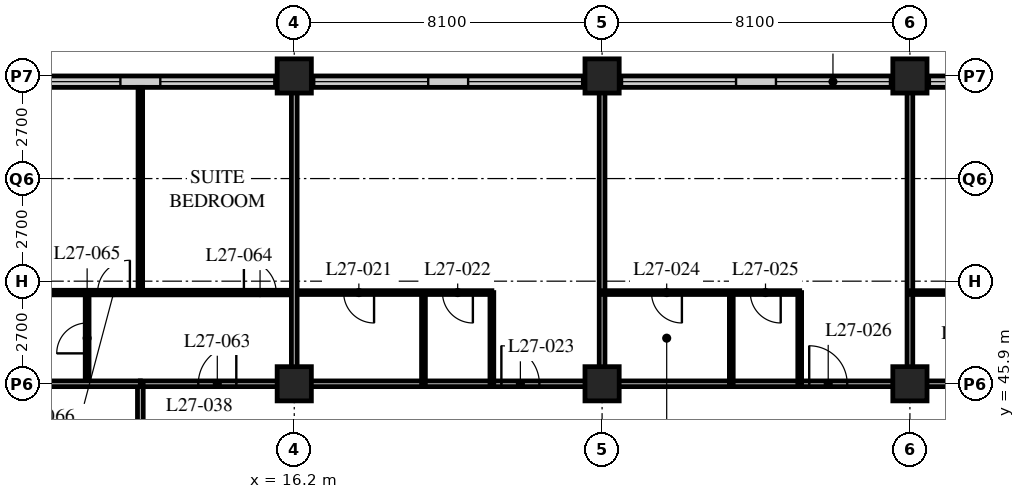
"""IFC4 building model, lengths in metres.
Left out: names, types, materials, properties, quantities, classifications, styles, units other than length and angle.
Written with IfcOpenShell. Run it as: python <this file> out.ifc"""

import sys

from ifc_helpers import new_model, si_unit, direction, frame, frame_2d, origin, origin_2d, place, context, subcontext, project, spatial, rectangle, hollow_rectangle, extrude, element, fill, save


model = new_model("IFC4")
c1 = context("Model", 3, precision=1e-05, world=origin(), true_north=direction((0.0, 1.0)))
c2 = subcontext(c1, "Body", "Model", "MODEL_VIEW")
j1 = project(units=[si_unit("LENGTHUNIT", "METRE"), si_unit("PLANEANGLEUNIT", "RADIAN")], contexts=[c1])
p1 = place(None, origin())
s1 = spatial("IfcSite", under=j1, at=p1, CompositionType="ELEMENT")
p2 = place(p1, origin())
s2 = spatial("IfcBuilding", under=s1, at=p2, CompositionType="ELEMENT")
p3 = place(p2, frame((0.0, 0.0, 110.2)))
s3 = spatial("IfcBuildingStorey", under=s2, at=p3, CompositionType="ELEMENT", Elevation=110.2)
for number, where, z_axis, x_axis in (
    (1, (16.2, 45.9, 0.0), (0.0, 0.0, 1.0), (1.0, 0.0, 0.0)),
    (2, (16.2, 54.0, 0.0), (0.0, 0.0, 1.0), (1.0, 0.0, 0.0)),
    (3, (24.3, 45.9, 0.0), (0.0, 0.0, 1.0), (1.0, 0.0, 0.0)),
    (4, (24.3, 54.0, 0.0), (0.0, 0.0, 1.0), (1.0, 0.0, 0.0)),
    (5, (32.4, 45.9, 0.0), (0.0, 0.0, 1.0), (1.0, 0.0, 0.0)),
    (6, (32.4, 54.0, 0.0), (0.0, 0.0, 1.0), (1.0, 0.0, 0.0)),
):
    element("IfcColumn", number, at=place(p3, frame(where, z_axis=z_axis, x_axis=x_axis)), inside=s3, PredefinedType="COLUMN", context=c2, shape_type="SweptSolid", body=[
        extrude(hollow_rectangle(XDim=0.9, YDim=0.9, WallThickness=0.09, at=origin_2d()), origin(), (0.0, 0.0, 1.0), 3.4),
    ])
p4 = place(p3, frame((48.3, 53.85, 0.0), z_axis=(0.0, 0.0, 1.0), x_axis=(-1.0, 0.0, 0.0)))
e7 = element("IfcWall", 7, at=p4, inside=s3, PredefinedType="SOLIDWALL", context=c2, shape_type="SweptSolid", body=[
    extrude(rectangle(XDim=40.2, YDim=0.3, at=frame_2d((20.1, 0.0))), origin(), (0.0, 0.0, 1.0), 3.19),
])
p5 = place(p4, frame((0.225, 0.0, 0.9)))
e8 = element("IfcOpeningElement", 8, at=p5, cuts=e7, PredefinedType="OPENING", context=c2, shape_type="SweptSolid", body=[
    extrude(rectangle(XDim=3.0, YDim=2.0, at=frame_2d((1.5, 1.0))), frame((0.0, 0.16, 0.0), z_axis=(0.0, -1.0, 0.0), x_axis=(1.0, 0.0, 0.0)), (0.0, 0.0, 1.0), 0.32),
])
p6 = place(p4, frame((4.275, 0.0, 0.9)))
e9 = element("IfcOpeningElement", 9, at=p6, cuts=e7, PredefinedType="OPENING", context=c2, shape_type="SweptSolid", body=[
    extrude(rectangle(XDim=3.0, YDim=2.0, at=frame_2d((1.5, 1.0))), frame((0.0, 0.16, 0.0), z_axis=(0.0, -1.0, 0.0), x_axis=(1.0, 0.0, 0.0)), (0.0, 0.0, 1.0), 0.32),
])
p7 = place(p4, frame((8.325, 0.0, 0.9)))
e10 = element("IfcOpeningElement", 10, at=p7, cuts=e7, PredefinedType="OPENING", context=c2, shape_type="SweptSolid", body=[
    extrude(rectangle(XDim=3.0, YDim=2.0, at=frame_2d((1.5, 1.0))), frame((0.0, 0.16, 0.0), z_axis=(0.0, -1.0, 0.0), x_axis=(1.0, 0.0, 0.0)), (0.0, 0.0, 1.0), 0.32),
])
p8 = place(p4, frame((12.375, 0.0, 0.9)))
e11 = element("IfcOpeningElement", 11, at=p8, cuts=e7, PredefinedType="OPENING", context=c2, shape_type="SweptSolid", body=[
    extrude(rectangle(XDim=3.0, YDim=2.0, at=frame_2d((1.5, 1.0))), frame((0.0, 0.16, 0.0), z_axis=(0.0, -1.0, 0.0), x_axis=(1.0, 0.0, 0.0)), (0.0, 0.0, 1.0), 0.32),
])
p9 = place(p4, frame((16.425, 0.0, 0.9)))
e12 = element("IfcOpeningElement", 12, at=p9, cuts=e7, PredefinedType="OPENING", context=c2, shape_type="SweptSolid", body=[
    extrude(rectangle(XDim=3.0, YDim=2.0, at=frame_2d((1.5, 1.0))), frame((0.0, 0.16, 0.0), z_axis=(0.0, -1.0, 0.0), x_axis=(1.0, 0.0, 0.0)), (0.0, 0.0, 1.0), 0.32),
])
p10 = place(p4, frame((20.475, 0.0, 0.9)))
e13 = element("IfcOpeningElement", 13, at=p10, cuts=e7, PredefinedType="OPENING", context=c2, shape_type="SweptSolid", body=[
    extrude(rectangle(XDim=3.0, YDim=2.0, at=frame_2d((1.5, 1.0))), frame((0.0, 0.16, 0.0), z_axis=(0.0, -1.0, 0.0), x_axis=(1.0, 0.0, 0.0)), (0.0, 0.0, 1.0), 0.32),
])
p11 = place(p4, frame((24.525, 0.0, 0.9)))
e14 = element("IfcOpeningElement", 14, at=p11, cuts=e7, PredefinedType="OPENING", context=c2, shape_type="SweptSolid", body=[
    extrude(rectangle(XDim=3.0, YDim=2.0, at=frame_2d((1.5, 1.0))), frame((0.0, 0.16, 0.0), z_axis=(0.0, -1.0, 0.0), x_axis=(1.0, 0.0, 0.0)), (0.0, 0.0, 1.0), 0.32),
])
p12 = place(p4, frame((28.575, 0.0, 0.9)))
e15 = element("IfcOpeningElement", 15, at=p12, cuts=e7, PredefinedType="OPENING", context=c2, shape_type="SweptSolid", body=[
    extrude(rectangle(XDim=3.0, YDim=2.0, at=frame_2d((1.5, 1.0))), frame((0.0, 0.16, 0.0), z_axis=(0.0, -1.0, 0.0), x_axis=(1.0, 0.0, 0.0)), (0.0, 0.0, 1.0), 0.32),
])
p13 = place(p4, frame((32.625, 0.0, 0.9)))
e16 = element("IfcOpeningElement", 16, at=p13, cuts=e7, PredefinedType="OPENING", context=c2, shape_type="SweptSolid", body=[
    extrude(rectangle(XDim=3.0, YDim=2.0, at=frame_2d((1.5, 1.0))), frame((0.0, 0.16, 0.0), z_axis=(0.0, -1.0, 0.0), x_axis=(1.0, 0.0, 0.0)), (0.0, 0.0, 1.0), 0.32),
])
p14 = place(p4, frame((36.675, 0.0, 0.9)))
e17 = element("IfcOpeningElement", 17, at=p14, cuts=e7, PredefinedType="OPENING", context=c2, shape_type="SweptSolid", body=[
    extrude(rectangle(XDim=3.0, YDim=2.0, at=frame_2d((1.5, 1.0))), frame((0.0, 0.16, 0.0), z_axis=(0.0, -1.0, 0.0), x_axis=(1.0, 0.0, 0.0)), (0.0, 0.0, 1.0), 0.32),
])
p15 = place(p3, frame((12.15, 45.9, 0.0), z_axis=(0.0, 0.0, 1.0), x_axis=(1.0, 0.0, 0.0)))
e18 = element("IfcWall", 18, at=p15, inside=s3, PredefinedType="PARTITIONING", context=c2, shape_type="SweptSolid", body=[
    extrude(rectangle(XDim=32.4, YDim=0.15, at=frame_2d((16.2, 0.0))), origin(), (0.0, 0.0, 1.0), 2.578),
])
p16 = place(p15, frame((9.5, 0.0, 0.0)))
e19 = element("IfcOpeningElement", 19, at=p16, cuts=e18, PredefinedType="OPENING", context=c2, shape_type="SweptSolid", body=[
    extrude(rectangle(XDim=1.0, YDim=2.1, at=frame_2d((0.5, 1.05))), frame((0.0, 0.085, 0.0), z_axis=(0.0, -1.0, 0.0), x_axis=(1.0, 0.0, 0.0)), (0.0, 0.0, 1.0), 0.17),
])
p17 = place(p15, frame((17.6, 0.0, 0.0)))
e20 = element("IfcOpeningElement", 20, at=p17, cuts=e18, PredefinedType="OPENING", context=c2, shape_type="SweptSolid", body=[
    extrude(rectangle(XDim=1.0, YDim=2.1, at=frame_2d((0.5, 1.05))), frame((0.0, 0.085, 0.0), z_axis=(0.0, -1.0, 0.0), x_axis=(1.0, 0.0, 0.0)), (0.0, 0.0, 1.0), 0.17),
])
p18 = place(p15, frame((25.7, 0.0, 0.0)))
e21 = element("IfcOpeningElement", 21, at=p18, cuts=e18, PredefinedType="OPENING", context=c2, shape_type="SweptSolid", body=[
    extrude(rectangle(XDim=1.0, YDim=2.1, at=frame_2d((0.5, 1.05))), frame((0.0, 0.085, 0.0), z_axis=(0.0, -1.0, 0.0), x_axis=(1.0, 0.0, 0.0)), (0.0, 0.0, 1.0), 0.17),
])
p19 = place(p15, frame((29.875, 0.0, 0.0)))
e22 = element("IfcOpeningElement", 22, at=p19, cuts=e18, PredefinedType="OPENING", context=c2, shape_type="SweptSolid", body=[
    extrude(rectangle(XDim=1.0, YDim=2.1, at=frame_2d((0.5, 1.05))), frame((0.0, 0.085, 0.0), z_axis=(0.0, -1.0, 0.0), x_axis=(1.0, 0.0, 0.0)), (0.0, 0.0, 1.0), 0.17),
])
p20 = place(p15, frame((1.525, 0.0, 0.0)))
e23 = element("IfcOpeningElement", 23, at=p20, cuts=e18, PredefinedType="OPENING", context=c2, shape_type="SweptSolid", body=[
    extrude(rectangle(XDim=1.0, YDim=2.1, at=frame_2d((0.5, 1.05))), frame((0.0, 0.085, 0.0), z_axis=(0.0, -1.0, 0.0), x_axis=(1.0, 0.0, 0.0)), (0.0, 0.0, 1.0), 0.17),
])
p21 = place(p3, frame((12.15, 21.6, 0.0), z_axis=(0.0, 0.0, 1.0), x_axis=(0.0, 1.0, 0.0)))
e24 = element("IfcWall", 24, at=p21, inside=s3, PredefinedType="PARTITIONING", context=c2, shape_type="SweptSolid", body=[
    extrude(rectangle(XDim=24.3, YDim=0.15, at=frame_2d((12.15, 0.0))), origin(), (0.0, 0.0, 1.0), 3.19),
])
p22 = place(p21, frame((5.45, 0.0, 0.0)))
e25 = element("IfcOpeningElement", 25, at=p22, cuts=e24, PredefinedType="OPENING", context=c2, shape_type="SweptSolid", body=[
    extrude(rectangle(XDim=1.0, YDim=2.1, at=frame_2d((0.5, 1.05))), frame((0.0, 0.085, 0.0), z_axis=(0.0, -1.0, 0.0), x_axis=(1.0, 0.0, 0.0)), (0.0, 0.0, 1.0), 0.17),
])
p23 = place(p21, frame((13.55, 0.0, 0.0)))
e26 = element("IfcOpeningElement", 26, at=p23, cuts=e24, PredefinedType="OPENING", context=c2, shape_type="SweptSolid", body=[
    extrude(rectangle(XDim=1.0, YDim=2.1, at=frame_2d((0.5, 1.05))), frame((0.0, 0.085, 0.0), z_axis=(0.0, -1.0, 0.0), x_axis=(1.0, 0.0, 0.0)), (0.0, 0.0, 1.0), 0.17),
])
p24 = place(p21, frame((21.65, 0.0, 0.0)))
e27 = element("IfcOpeningElement", 27, at=p24, cuts=e24, PredefinedType="OPENING", context=c2, shape_type="SweptSolid", body=[
    extrude(rectangle(XDim=1.0, YDim=2.1, at=frame_2d((0.5, 1.05))), frame((0.0, 0.085, 0.0), z_axis=(0.0, -1.0, 0.0), x_axis=(1.0, 0.0, 0.0)), (0.0, 0.0, 1.0), 0.17),
])
p25 = place(p3, frame((16.2, 48.3, 0.0), z_axis=(0.0, 0.0, 1.0), x_axis=(1.0, 0.0, 0.0)))
e28 = element("IfcWall", 28, at=p25, inside=s3, PredefinedType="PARTITIONING", context=c2, shape_type="SweptSolid", body=[
    extrude(rectangle(XDim=5.2, YDim=0.1, at=frame_2d((2.6, 0.0))), origin(), (0.0, 0.0, 1.0), 3.19),
])
p26 = place(p25, frame((1.3, 0.0, 0.0)))
e29 = element("IfcOpeningElement", 29, at=p26, cuts=e28, PredefinedType="OPENING", context=c2, shape_type="SweptSolid", body=[
    extrude(rectangle(XDim=0.8, YDim=2.1, at=frame_2d((0.4, 1.05))), frame((0.0, 0.06, 0.0), z_axis=(0.0, -1.0, 0.0), x_axis=(1.0, 0.0, 0.0)), (0.0, 0.0, 1.0), 0.12),
])
p27 = place(p25, frame((3.9, 0.0, 0.0)))
e30 = element("IfcOpeningElement", 30, at=p27, cuts=e28, PredefinedType="OPENING", context=c2, shape_type="SweptSolid", body=[
    extrude(rectangle(XDim=0.8, YDim=2.1, at=frame_2d((0.4, 1.05))), frame((0.0, 0.06, 0.0), z_axis=(0.0, -1.0, 0.0), x_axis=(1.0, 0.0, 0.0)), (0.0, 0.0, 1.0), 0.12),
])
for number, where, z_axis, x_axis in (
    (31, (19.6, 45.9, 0.0), (0.0, 0.0, 1.0), (0.0, 1.0, 0.0)),
    (32, (21.4, 45.9, 0.0), (0.0, 0.0, 1.0), (0.0, 1.0, 0.0)),
):
    element("IfcWall", number, at=place(p3, frame(where, z_axis=z_axis, x_axis=x_axis)), inside=s3, PredefinedType="PARTITIONING", context=c2, shape_type="SweptSolid", body=[
        extrude(rectangle(XDim=2.4, YDim=0.1, at=frame_2d((1.2, 0.0))), origin(), (0.0, 0.0, 1.0), 3.19),
    ])
p28 = place(p3, frame((24.3, 45.9, 0.0), z_axis=(0.0, 0.0, 1.0), x_axis=(0.0, 1.0, 0.0)))
e33 = element("IfcWall", 33, at=p28, inside=s3, PredefinedType="PARTITIONING", context=c2, shape_type="SweptSolid", body=[
    extrude(rectangle(XDim=7.8, YDim=0.15, at=frame_2d((3.9, 0.0))), origin(), (0.0, 0.0, 1.0), 2.578),
])
p29 = place(p3, frame((24.3, 48.3, 0.0), z_axis=(0.0, 0.0, 1.0), x_axis=(1.0, 0.0, 0.0)))
e34 = element("IfcWall", 34, at=p29, inside=s3, PredefinedType="PARTITIONING", context=c2, shape_type="SweptSolid", body=[
    extrude(rectangle(XDim=5.2, YDim=0.1, at=frame_2d((2.6, 0.0))), origin(), (0.0, 0.0, 1.0), 3.19),
])
p30 = place(p29, frame((1.3, 0.0, 0.0)))
e35 = element("IfcOpeningElement", 35, at=p30, cuts=e34, PredefinedType="OPENING", context=c2, shape_type="SweptSolid", body=[
    extrude(rectangle(XDim=0.8, YDim=2.1, at=frame_2d((0.4, 1.05))), frame((0.0, 0.06, 0.0), z_axis=(0.0, -1.0, 0.0), x_axis=(1.0, 0.0, 0.0)), (0.0, 0.0, 1.0), 0.12),
])
p31 = place(p29, frame((3.9, 0.0, 0.0)))
e36 = element("IfcOpeningElement", 36, at=p31, cuts=e34, PredefinedType="OPENING", context=c2, shape_type="SweptSolid", body=[
    extrude(rectangle(XDim=0.8, YDim=2.1, at=frame_2d((0.4, 1.05))), frame((0.0, 0.06, 0.0), z_axis=(0.0, -1.0, 0.0), x_axis=(1.0, 0.0, 0.0)), (0.0, 0.0, 1.0), 0.12),
])
for number, where, z_axis, x_axis in (
    (37, (27.7, 45.9, 0.0), (0.0, 0.0, 1.0), (0.0, 1.0, 0.0)),
    (38, (29.5, 45.9, 0.0), (0.0, 0.0, 1.0), (0.0, 1.0, 0.0)),
):
    element("IfcWall", number, at=place(p3, frame(where, z_axis=z_axis, x_axis=x_axis)), inside=s3, PredefinedType="PARTITIONING", context=c2, shape_type="SweptSolid", body=[
        extrude(rectangle(XDim=2.4, YDim=0.1, at=frame_2d((1.2, 0.0))), origin(), (0.0, 0.0, 1.0), 3.19),
    ])
p32 = place(p3, frame((32.4, 45.9, 0.0), z_axis=(0.0, 0.0, 1.0), x_axis=(0.0, 1.0, 0.0)))
e39 = element("IfcWall", 39, at=p32, inside=s3, PredefinedType="PARTITIONING", context=c2, shape_type="SweptSolid", body=[
    extrude(rectangle(XDim=7.8, YDim=0.15, at=frame_2d((3.9, 0.0))), origin(), (0.0, 0.0, 1.0), 2.578),
])
p33 = place(p3, frame((32.4, 48.3, 0.0), z_axis=(0.0, 0.0, 1.0), x_axis=(1.0, 0.0, 0.0)))
e40 = element("IfcWall", 40, at=p33, inside=s3, PredefinedType="PARTITIONING", context=c2, shape_type="SweptSolid", body=[
    extrude(rectangle(XDim=5.2, YDim=0.1, at=frame_2d((2.6, 0.0))), origin(), (0.0, 0.0, 1.0), 3.19),
])
p34 = place(p33, frame((1.3, 0.0, 0.0)))
e41 = element("IfcOpeningElement", 41, at=p34, cuts=e40, PredefinedType="OPENING", context=c2, shape_type="SweptSolid", body=[
    extrude(rectangle(XDim=0.8, YDim=2.1, at=frame_2d((0.4, 1.05))), frame((0.0, 0.06, 0.0), z_axis=(0.0, -1.0, 0.0), x_axis=(1.0, 0.0, 0.0)), (0.0, 0.0, 1.0), 0.12),
])
p35 = place(p33, frame((3.9, 0.0, 0.0)))
e42 = element("IfcOpeningElement", 42, at=p35, cuts=e40, PredefinedType="OPENING", context=c2, shape_type="SweptSolid", body=[
    extrude(rectangle(XDim=0.8, YDim=2.1, at=frame_2d((0.4, 1.05))), frame((0.0, 0.06, 0.0), z_axis=(0.0, -1.0, 0.0), x_axis=(1.0, 0.0, 0.0)), (0.0, 0.0, 1.0), 0.12),
])
p36 = place(p3, frame((10.75, 45.9, 0.0), z_axis=(0.0, 0.0, 1.0), x_axis=(0.0, 1.0, 0.0)))
e43 = element("IfcWall", 43, at=p36, inside=s3, PredefinedType="PARTITIONING", context=c2, shape_type="SweptSolid", body=[
    extrude(rectangle(XDim=2.4, YDim=0.1, at=frame_2d((1.2, 0.0))), origin(), (0.0, 0.0, 1.0), 3.19),
])
p37 = place(p36, frame((0.8, 0.0, 0.0)))
e44 = element("IfcOpeningElement", 44, at=p37, cuts=e43, PredefinedType="OPENING", context=c2, shape_type="SweptSolid", body=[
    extrude(rectangle(XDim=0.8, YDim=2.1, at=frame_2d((0.4, 1.05))), frame((0.0, 0.06, 0.0), z_axis=(0.0, -1.0, 0.0), x_axis=(1.0, 0.0, 0.0)), (0.0, 0.0, 1.0), 0.12),
])
p38 = place(p3, frame((8.15, 48.3, 0.0), z_axis=(0.0, 0.0, 1.0), x_axis=(1.0, 0.0, 0.0)))
e45 = element("IfcWall", 45, at=p38, inside=s3, PredefinedType="PARTITIONING", context=c2, shape_type="SweptSolid", body=[
    extrude(rectangle(XDim=8.05, YDim=0.12, at=frame_2d((4.025, 0.0))), origin(), (0.0, 0.0, 1.0), 3.19),
])
p39 = place(p38, frame((6.725, 0.0, 0.0)))
e46 = element("IfcOpeningElement", 46, at=p39, cuts=e45, PredefinedType="OPENING", context=c2, shape_type="SweptSolid", body=[
    extrude(rectangle(XDim=0.85, YDim=2.1, at=frame_2d((0.425, 1.05))), frame((0.0, 0.07, 0.0), z_axis=(0.0, -1.0, 0.0), x_axis=(1.0, 0.0, 0.0)), (0.0, 0.0, 1.0), 0.14),
])
p40 = place(p38, frame((2.875, 0.0, 0.0)))
e47 = element("IfcOpeningElement", 47, at=p40, cuts=e45, PredefinedType="OPENING", context=c2, shape_type="SweptSolid", body=[
    extrude(rectangle(XDim=0.85, YDim=2.1, at=frame_2d((0.425, 1.05))), frame((0.0, 0.07, 0.0), z_axis=(0.0, -1.0, 0.0), x_axis=(1.0, 0.0, 0.0)), (0.0, 0.0, 1.0), 0.14),
])
p41 = place(p3, frame((12.15, 48.3, 0.0), z_axis=(0.0, 0.0, 1.0), x_axis=(0.0, 1.0, 0.0)))
e48 = element("IfcWall", 48, at=p41, inside=s3, PredefinedType="PARTITIONING", context=c2, shape_type="SweptSolid", body=[
    extrude(rectangle(XDim=5.4, YDim=0.12, at=frame_2d((2.7, 0.0))), origin(), (0.0, 0.0, 1.0), 3.19),
])
p42 = place(p3, frame((4.35, 45.9, 0.0), z_axis=(0.0, 0.0, 1.0), x_axis=(1.0, 0.0, 0.0)))
e49 = element("IfcWall", 49, at=p42, inside=s3, PredefinedType="PARTITIONING", context=c2, shape_type="SweptSolid", body=[
    extrude(rectangle(XDim=7.8, YDim=0.15, at=frame_2d((3.9, 0.0))), origin(), (0.0, 0.0, 1.0), 2.578),
])
p43 = place(p3, frame((16.2, 45.9, 0.0), z_axis=(0.0, 0.0, 1.0), x_axis=(0.0, 1.0, 0.0)))
e50 = element("IfcWall", 50, at=p43, inside=s3, PredefinedType="PARTITIONING", context=c2, shape_type="SweptSolid", body=[
    extrude(rectangle(XDim=7.8, YDim=0.15, at=frame_2d((3.9, 0.0))), origin(), (0.0, 0.0, 1.0), 2.578),
])
p44 = place(p8, origin())
e51 = element("IfcWindow", 51, at=p44, inside=s3, PartitioningType="SINGLE_PANEL", PredefinedType="WINDOW", context=c2, shape_type="SweptSolid", body=[
    extrude(rectangle(XDim=3.0, YDim=2.0, at=frame_2d((1.5, 1.0))), frame((0.0, 0.03, 0.0), z_axis=(0.0, -1.0, 0.0), x_axis=(1.0, 0.0, 0.0)), (0.0, 0.0, 1.0), 0.06),
])
fill(e11, e51)
p45 = place(p9, origin())
e52 = element("IfcWindow", 52, at=p45, inside=s3, PartitioningType="SINGLE_PANEL", PredefinedType="WINDOW", context=c2, shape_type="SweptSolid", body=[
    extrude(rectangle(XDim=3.0, YDim=2.0, at=frame_2d((1.5, 1.0))), frame((0.0, 0.03, 0.0), z_axis=(0.0, -1.0, 0.0), x_axis=(1.0, 0.0, 0.0)), (0.0, 0.0, 1.0), 0.06),
])
fill(e12, e52)
p46 = place(p10, origin())
e53 = element("IfcWindow", 53, at=p46, inside=s3, PartitioningType="SINGLE_PANEL", PredefinedType="WINDOW", context=c2, shape_type="SweptSolid", body=[
    extrude(rectangle(XDim=3.0, YDim=2.0, at=frame_2d((1.5, 1.0))), frame((0.0, 0.03, 0.0), z_axis=(0.0, -1.0, 0.0), x_axis=(1.0, 0.0, 0.0)), (0.0, 0.0, 1.0), 0.06),
])
fill(e13, e53)
p47 = place(p11, origin())
e54 = element("IfcWindow", 54, at=p47, inside=s3, PartitioningType="SINGLE_PANEL", PredefinedType="WINDOW", context=c2, shape_type="SweptSolid", body=[
    extrude(rectangle(XDim=3.0, YDim=2.0, at=frame_2d((1.5, 1.0))), frame((0.0, 0.03, 0.0), z_axis=(0.0, -1.0, 0.0), x_axis=(1.0, 0.0, 0.0)), (0.0, 0.0, 1.0), 0.06),
])
fill(e14, e54)
p48 = place(p12, origin())
e55 = element("IfcWindow", 55, at=p48, inside=s3, PartitioningType="SINGLE_PANEL", PredefinedType="WINDOW", context=c2, shape_type="SweptSolid", body=[
    extrude(rectangle(XDim=3.0, YDim=2.0, at=frame_2d((1.5, 1.0))), frame((0.0, 0.03, 0.0), z_axis=(0.0, -1.0, 0.0), x_axis=(1.0, 0.0, 0.0)), (0.0, 0.0, 1.0), 0.06),
])
fill(e15, e55)
p49 = place(p13, origin())
e56 = element("IfcWindow", 56, at=p49, inside=s3, PartitioningType="SINGLE_PANEL", PredefinedType="WINDOW", context=c2, shape_type="SweptSolid", body=[
    extrude(rectangle(XDim=3.0, YDim=2.0, at=frame_2d((1.5, 1.0))), frame((0.0, 0.03, 0.0), z_axis=(0.0, -1.0, 0.0), x_axis=(1.0, 0.0, 0.0)), (0.0, 0.0, 1.0), 0.06),
])
fill(e16, e56)
p50 = place(p14, origin())
e57 = element("IfcWindow", 57, at=p50, inside=s3, PartitioningType="SINGLE_PANEL", PredefinedType="WINDOW", context=c2, shape_type="SweptSolid", body=[
    extrude(rectangle(XDim=3.0, YDim=2.0, at=frame_2d((1.5, 1.0))), frame((0.0, 0.03, 0.0), z_axis=(0.0, -1.0, 0.0), x_axis=(1.0, 0.0, 0.0)), (0.0, 0.0, 1.0), 0.06),
])
fill(e17, e57)
p51 = place(p26, origin())
e58 = element("IfcDoor", 58, at=p51, inside=s3, OperationType="SINGLE_SWING_LEFT", PredefinedType="DOOR", context=c2, shape_type="SweptSolid", body=[
    extrude(rectangle(XDim=0.8, YDim=2.1, at=frame_2d((0.4, 1.05))), frame((0.0, 0.025, 0.0), z_axis=(0.0, -1.0, 0.0), x_axis=(1.0, 0.0, 0.0)), (0.0, 0.0, 1.0), 0.05),
])
fill(e29, e58)
p52 = place(p27, origin())
e59 = element("IfcDoor", 59, at=p52, inside=s3, OperationType="SINGLE_SWING_LEFT", PredefinedType="DOOR", context=c2, shape_type="SweptSolid", body=[
    extrude(rectangle(XDim=0.8, YDim=2.1, at=frame_2d((0.4, 1.05))), frame((0.0, 0.025, 0.0), z_axis=(0.0, -1.0, 0.0), x_axis=(1.0, 0.0, 0.0)), (0.0, 0.0, 1.0), 0.05),
])
fill(e30, e59)
p53 = place(p16, origin())
e60 = element("IfcDoor", 60, at=p53, inside=s3, OperationType="SINGLE_SWING_LEFT", PredefinedType="DOOR", context=c2, shape_type="SweptSolid", body=[
    extrude(rectangle(XDim=1.0, YDim=2.1, at=frame_2d((0.5, 1.05))), frame((0.0, 0.025, 0.0), z_axis=(0.0, -1.0, 0.0), x_axis=(1.0, 0.0, 0.0)), (0.0, 0.0, 1.0), 0.05),
])
fill(e19, e60)
p54 = place(p30, origin())
e61 = element("IfcDoor", 61, at=p54, inside=s3, OperationType="SINGLE_SWING_LEFT", PredefinedType="DOOR", context=c2, shape_type="SweptSolid", body=[
    extrude(rectangle(XDim=0.8, YDim=2.1, at=frame_2d((0.4, 1.05))), frame((0.0, 0.025, 0.0), z_axis=(0.0, -1.0, 0.0), x_axis=(1.0, 0.0, 0.0)), (0.0, 0.0, 1.0), 0.05),
])
fill(e35, e61)
p55 = place(p31, origin())
e62 = element("IfcDoor", 62, at=p55, inside=s3, OperationType="SINGLE_SWING_LEFT", PredefinedType="DOOR", context=c2, shape_type="SweptSolid", body=[
    extrude(rectangle(XDim=0.8, YDim=2.1, at=frame_2d((0.4, 1.05))), frame((0.0, 0.025, 0.0), z_axis=(0.0, -1.0, 0.0), x_axis=(1.0, 0.0, 0.0)), (0.0, 0.0, 1.0), 0.05),
])
fill(e36, e62)
p56 = place(p17, origin())
e63 = element("IfcDoor", 63, at=p56, inside=s3, OperationType="SINGLE_SWING_LEFT", PredefinedType="DOOR", context=c2, shape_type="SweptSolid", body=[
    extrude(rectangle(XDim=1.0, YDim=2.1, at=frame_2d((0.5, 1.05))), frame((0.0, 0.025, 0.0), z_axis=(0.0, -1.0, 0.0), x_axis=(1.0, 0.0, 0.0)), (0.0, 0.0, 1.0), 0.05),
])
fill(e20, e63)
p57 = place(p20, origin())
e64 = element("IfcDoor", 64, at=p57, inside=s3, OperationType="SINGLE_SWING_RIGHT", PredefinedType="DOOR", context=c2, shape_type="SweptSolid", body=[
    extrude(rectangle(XDim=1.0, YDim=2.1, at=frame_2d((0.5, 1.05))), frame((0.0, 0.025, 0.0), z_axis=(0.0, -1.0, 0.0), x_axis=(1.0, 0.0, 0.0)), (0.0, 0.0, 1.0), 0.05),
])
fill(e23, e64)
p58 = place(p39, origin())
e65 = element("IfcDoor", 65, at=p58, inside=s3, OperationType="SINGLE_SWING_LEFT", PredefinedType="DOOR", context=c2, shape_type="SweptSolid", body=[
    extrude(rectangle(XDim=0.85, YDim=2.1, at=frame_2d((0.425, 1.05))), frame((0.0, 0.025, 0.0), z_axis=(0.0, -1.0, 0.0), x_axis=(1.0, 0.0, 0.0)), (0.0, 0.0, 1.0), 0.05),
])
fill(e46, e65)
p59 = place(p37, origin())
e66 = element("IfcDoor", 66, at=p59, inside=s3, OperationType="SINGLE_SWING_LEFT", PredefinedType="DOOR", context=c2, shape_type="SweptSolid", body=[
    extrude(rectangle(XDim=0.8, YDim=2.1, at=frame_2d((0.4, 1.05))), frame((0.0, 0.025, 0.0), z_axis=(0.0, -1.0, 0.0), x_axis=(1.0, 0.0, 0.0)), (0.0, 0.0, 1.0), 0.05),
])
fill(e44, e66)
p60 = place(p40, origin())
e67 = element("IfcDoor", 67, at=p60, inside=s3, OperationType="SINGLE_SWING_RIGHT", PredefinedType="DOOR", context=c2, shape_type="SweptSolid", body=[
    extrude(rectangle(XDim=0.85, YDim=2.1, at=frame_2d((0.425, 1.05))), frame((0.0, 0.025, 0.0), z_axis=(0.0, -1.0, 0.0), x_axis=(1.0, 0.0, 0.0)), (0.0, 0.0, 1.0), 0.05),
])
fill(e47, e67)
save(model, sys.argv[1])
